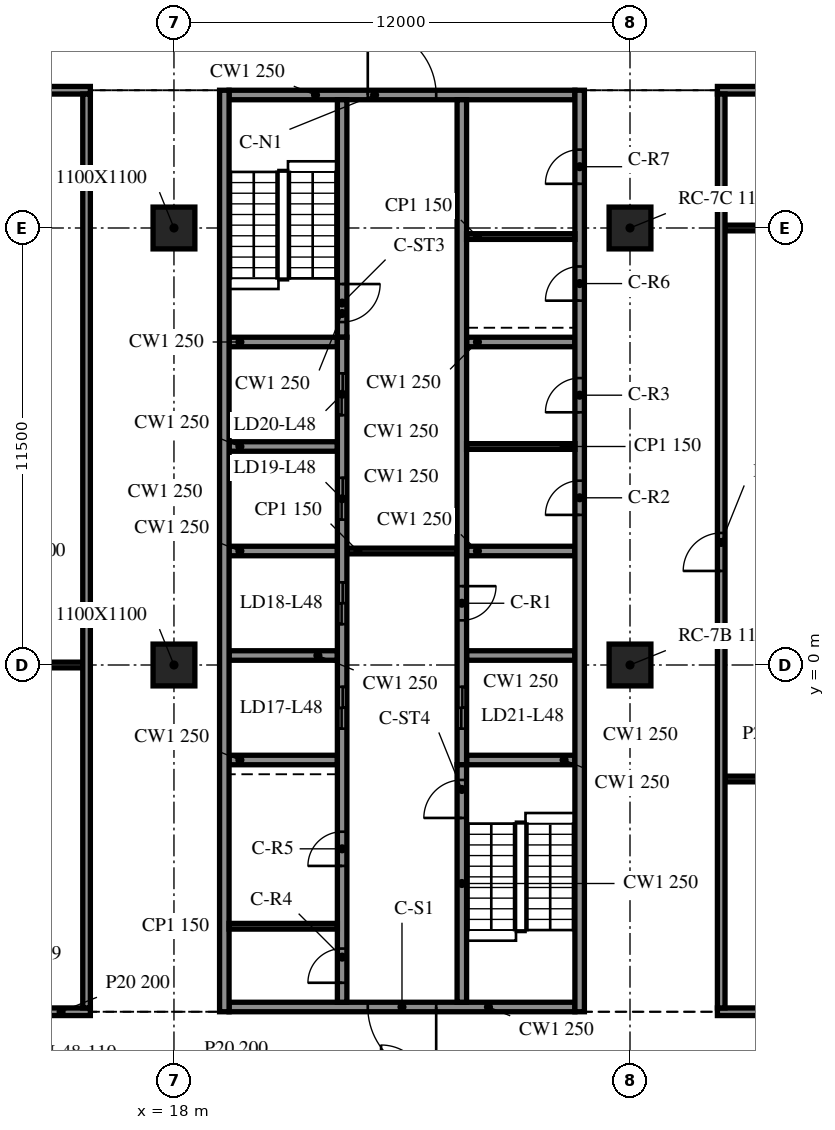
"""IFC4 building model, lengths in metres.
Left out: names, types, materials, properties, quantities, classifications, styles, units other than length and angle.
Written with IfcOpenShell. Run it as: python <this file> out.ifc"""

import sys

from ifc_helpers import new_model, si_unit, direction, frame, frame_2d, origin, origin_2d, place, context, subcontext, project, spatial, rectangle, extrude, element, fill, save


model = new_model("IFC4")
c1 = context("Model", 3, precision=1e-05, world=origin(), true_north=direction((0.0, 1.0)))
c2 = subcontext(c1, "Body", "Model", "MODEL_VIEW")
j1 = project(units=[si_unit("LENGTHUNIT", "METRE"), si_unit("PLANEANGLEUNIT", "RADIAN")], contexts=[c1])
p1 = place(None, origin())
s1 = spatial("IfcSite", under=j1, at=p1, CompositionType="ELEMENT")
p2 = place(p1, origin())
s2 = spatial("IfcBuilding", under=s1, at=p2, CompositionType="ELEMENT")
p3 = place(p2, frame((0.0, 0.0, 201.5)))
s3 = spatial("IfcBuildingStorey", under=s2, at=p3, CompositionType="ELEMENT", Elevation=201.5)
for number, where, z_axis, x_axis in (
    (1, (18.0, 0.0, -0.34), (0.0, 0.0, 1.0), (1.0, 0.0, 0.0)),
    (2, (18.0, 11.5, -0.34), (0.0, 0.0, 1.0), (1.0, 0.0, 0.0)),
    (3, (30.0, 0.0, -0.34), (0.0, 0.0, 1.0), (1.0, 0.0, 0.0)),
    (4, (30.0, 11.5, -0.34), (0.0, 0.0, 1.0), (1.0, 0.0, 0.0)),
):
    element("IfcColumn", number, at=place(p3, frame(where, z_axis=z_axis, x_axis=x_axis)), inside=s3, PredefinedType="COLUMN", context=c2, shape_type="SweptSolid", body=[
        extrude(rectangle(XDim=1.1, YDim=1.1, at=origin_2d()), origin(), (0.0, 0.0, 1.0), 3.8),
    ])
p4 = place(p3, frame((19.325, 15.125, 0.0), z_axis=(0.0, 0.0, 1.0), x_axis=(0.0, -1.0, 0.0)))
e5 = element("IfcWall", 5, at=p4, inside=s3, PredefinedType="SOLIDWALL", context=c2, shape_type="SweptSolid", body=[
    extrude(rectangle(XDim=24.25, YDim=0.25, at=frame_2d((12.125, 0.0))), origin(), (0.0, 0.0, 1.0), 3.46),
])
p5 = place(p3, frame((28.675, -9.125, 0.0), z_axis=(0.0, 0.0, 1.0), x_axis=(0.0, 1.0, 0.0)))
e6 = element("IfcWall", 6, at=p5, inside=s3, PredefinedType="SOLIDWALL", context=c2, shape_type="SweptSolid", body=[
    extrude(rectangle(XDim=24.25, YDim=0.25, at=frame_2d((12.125, 0.0))), origin(), (0.0, 0.0, 1.0), 3.46),
])
p6 = place(p5, frame((13.075, 0.0, 0.0)))
e7 = element("IfcOpeningElement", 7, at=p6, cuts=e6, PredefinedType="OPENING", context=c2, shape_type="SweptSolid", body=[
    extrude(rectangle(XDim=0.9, YDim=2.1, at=frame_2d((0.45, 1.05))), frame((0.0, 0.135, 0.0), z_axis=(0.0, -1.0, 0.0), x_axis=(1.0, 0.0, 0.0)), (0.0, 0.0, 1.0), 0.27),
])
p7 = place(p5, frame((15.775, 0.0, 0.0)))
e8 = element("IfcOpeningElement", 8, at=p7, cuts=e6, PredefinedType="OPENING", context=c2, shape_type="SweptSolid", body=[
    extrude(rectangle(XDim=0.9, YDim=2.1, at=frame_2d((0.45, 1.05))), frame((0.0, 0.135, 0.0), z_axis=(0.0, -1.0, 0.0), x_axis=(1.0, 0.0, 0.0)), (0.0, 0.0, 1.0), 0.27),
])
p8 = place(p5, frame((18.712, 0.0, 0.0)))
e9 = element("IfcOpeningElement", 9, at=p8, cuts=e6, PredefinedType="OPENING", context=c2, shape_type="SweptSolid", body=[
    extrude(rectangle(XDim=0.9, YDim=2.1, at=frame_2d((0.45, 1.05))), frame((0.0, 0.135, 0.0), z_axis=(0.0, -1.0, 0.0), x_axis=(1.0, 0.0, 0.0)), (0.0, 0.0, 1.0), 0.27),
])
p9 = place(p5, frame((21.788, 0.0, 0.0)))
e10 = element("IfcOpeningElement", 10, at=p9, cuts=e6, PredefinedType="OPENING", context=c2, shape_type="SweptSolid", body=[
    extrude(rectangle(XDim=0.9, YDim=2.1, at=frame_2d((0.45, 1.05))), frame((0.0, 0.135, 0.0), z_axis=(0.0, -1.0, 0.0), x_axis=(1.0, 0.0, 0.0)), (0.0, 0.0, 1.0), 0.27),
])
p10 = place(p3, frame((28.55, -9.0, 0.0), z_axis=(0.0, 0.0, 1.0), x_axis=(-1.0, 0.0, 0.0)))
e11 = element("IfcWall", 11, at=p10, inside=s3, PredefinedType="SOLIDWALL", context=c2, shape_type="SweptSolid", body=[
    extrude(rectangle(XDim=9.1, YDim=0.25, at=frame_2d((4.55, 0.0))), origin(), (0.0, 0.0, 1.0), 3.46),
])
p11 = place(p10, frame((3.65, 0.0, 0.0)))
e12 = element("IfcOpeningElement", 12, at=p11, cuts=e11, PredefinedType="OPENING", context=c2, shape_type="SweptSolid", body=[
    extrude(rectangle(XDim=1.8, YDim=2.1, at=frame_2d((0.9, 1.05))), frame((0.0, 0.135, 0.0), z_axis=(0.0, -1.0, 0.0), x_axis=(1.0, 0.0, 0.0)), (0.0, 0.0, 1.0), 0.27),
])
p12 = place(p3, frame((19.45, 15.0, 0.0), z_axis=(0.0, 0.0, 1.0), x_axis=(1.0, 0.0, 0.0)))
e13 = element("IfcWall", 13, at=p12, inside=s3, PredefinedType="SOLIDWALL", context=c2, shape_type="SweptSolid", body=[
    extrude(rectangle(XDim=9.1, YDim=0.25, at=frame_2d((4.55, 0.0))), origin(), (0.0, 0.0, 1.0), 3.46),
])
p13 = place(p12, frame((3.65, 0.0, 0.0)))
e14 = element("IfcOpeningElement", 14, at=p13, cuts=e13, PredefinedType="OPENING", context=c2, shape_type="SweptSolid", body=[
    extrude(rectangle(XDim=1.8, YDim=2.1, at=frame_2d((0.9, 1.05))), frame((0.0, 0.135, 0.0), z_axis=(0.0, -1.0, 0.0), x_axis=(1.0, 0.0, 0.0)), (0.0, 0.0, 1.0), 0.27),
])
p14 = place(p3, frame((22.425, -8.875, 0.0), z_axis=(0.0, 0.0, 1.0), x_axis=(0.0, 1.0, 0.0)))
e15 = element("IfcWall", 15, at=p14, inside=s3, PredefinedType="SOLIDWALL", context=c2, shape_type="SweptSolid", body=[
    extrude(rectangle(XDim=17.5, YDim=0.25, at=frame_2d((8.75, 0.0))), origin(), (0.0, 0.0, 1.0), 3.46),
])
p15 = place(p14, frame((7.2, 0.0, 0.0)))
e16 = element("IfcOpeningElement", 16, at=p15, cuts=e15, PredefinedType="OPENING", context=c2, shape_type="SweptSolid", body=[
    extrude(rectangle(XDim=1.1, YDim=2.1, at=frame_2d((0.55, 1.05))), frame((0.0, 0.135, 0.0), z_axis=(0.0, -1.0, 0.0), x_axis=(1.0, 0.0, 0.0)), (0.0, 0.0, 1.0), 0.27),
])
p16 = place(p14, frame((9.95, 0.0, 0.0)))
e17 = element("IfcOpeningElement", 17, at=p16, cuts=e15, PredefinedType="OPENING", context=c2, shape_type="SweptSolid", body=[
    extrude(rectangle(XDim=1.1, YDim=2.1, at=frame_2d((0.55, 1.05))), frame((0.0, 0.135, 0.0), z_axis=(0.0, -1.0, 0.0), x_axis=(1.0, 0.0, 0.0)), (0.0, 0.0, 1.0), 0.27),
])
p17 = place(p14, frame((12.7, 0.0, 0.0)))
e18 = element("IfcOpeningElement", 18, at=p17, cuts=e15, PredefinedType="OPENING", context=c2, shape_type="SweptSolid", body=[
    extrude(rectangle(XDim=1.1, YDim=2.1, at=frame_2d((0.55, 1.05))), frame((0.0, 0.135, 0.0), z_axis=(0.0, -1.0, 0.0), x_axis=(1.0, 0.0, 0.0)), (0.0, 0.0, 1.0), 0.27),
])
p18 = place(p14, frame((15.45, 0.0, 0.0)))
e19 = element("IfcOpeningElement", 19, at=p18, cuts=e15, PredefinedType="OPENING", context=c2, shape_type="SweptSolid", body=[
    extrude(rectangle(XDim=1.1, YDim=2.1, at=frame_2d((0.55, 1.05))), frame((0.0, 0.135, 0.0), z_axis=(0.0, -1.0, 0.0), x_axis=(1.0, 0.0, 0.0)), (0.0, 0.0, 1.0), 0.27),
])
p19 = place(p14, frame((0.512, 0.0, 0.0)))
e20 = element("IfcOpeningElement", 20, at=p19, cuts=e15, PredefinedType="OPENING", context=c2, shape_type="SweptSolid", body=[
    extrude(rectangle(XDim=0.9, YDim=2.1, at=frame_2d((0.45, 1.05))), frame((0.0, 0.135, 0.0), z_axis=(0.0, -1.0, 0.0), x_axis=(1.0, 0.0, 0.0)), (0.0, 0.0, 1.0), 0.27),
])
p20 = place(p14, frame((3.587, 0.0, 0.0)))
e21 = element("IfcOpeningElement", 21, at=p20, cuts=e15, PredefinedType="OPENING", context=c2, shape_type="SweptSolid", body=[
    extrude(rectangle(XDim=0.9, YDim=2.1, at=frame_2d((0.45, 1.05))), frame((0.0, 0.135, 0.0), z_axis=(0.0, -1.0, 0.0), x_axis=(1.0, 0.0, 0.0)), (0.0, 0.0, 1.0), 0.27),
])
p21 = place(p3, frame((22.425, 14.875, 0.0), z_axis=(0.0, 0.0, 1.0), x_axis=(0.0, -1.0, 0.0)))
e22 = element("IfcWall", 22, at=p21, inside=s3, PredefinedType="SOLIDWALL", context=c2, shape_type="SweptSolid", body=[
    extrude(rectangle(XDim=6.25, YDim=0.25, at=frame_2d((3.125, 0.0))), origin(), (0.0, 0.0, 1.0), 3.46),
])
p22 = place(p21, frame((4.85, 0.0, 0.0)))
e23 = element("IfcOpeningElement", 23, at=p22, cuts=e22, PredefinedType="OPENING", context=c2, shape_type="SweptSolid", body=[
    extrude(rectangle(XDim=1.0, YDim=2.1, at=frame_2d((0.5, 1.05))), frame((0.0, 0.135, 0.0), z_axis=(0.0, -1.0, 0.0), x_axis=(1.0, 0.0, 0.0)), (0.0, 0.0, 1.0), 0.27),
])
p23 = place(p3, frame((25.575, -8.875, 0.0), z_axis=(0.0, 0.0, 1.0), x_axis=(0.0, 1.0, 0.0)))
e24 = element("IfcWall", 24, at=p23, inside=s3, PredefinedType="SOLIDWALL", context=c2, shape_type="SweptSolid", body=[
    extrude(rectangle(XDim=6.25, YDim=0.25, at=frame_2d((3.125, 0.0))), origin(), (0.0, 0.0, 1.0), 3.46),
])
p24 = place(p23, frame((4.85, 0.0, 0.0)))
e25 = element("IfcOpeningElement", 25, at=p24, cuts=e24, PredefinedType="OPENING", context=c2, shape_type="SweptSolid", body=[
    extrude(rectangle(XDim=1.0, YDim=2.1, at=frame_2d((0.5, 1.05))), frame((0.0, 0.135, 0.0), z_axis=(0.0, -1.0, 0.0), x_axis=(1.0, 0.0, 0.0)), (0.0, 0.0, 1.0), 0.27),
])
p25 = place(p3, frame((25.575, 14.875, 0.0), z_axis=(0.0, 0.0, 1.0), x_axis=(0.0, -1.0, 0.0)))
e26 = element("IfcWall", 26, at=p25, inside=s3, PredefinedType="SOLIDWALL", context=c2, shape_type="SweptSolid", body=[
    extrude(rectangle(XDim=17.5, YDim=0.25, at=frame_2d((8.75, 0.0))), origin(), (0.0, 0.0, 1.0), 3.46),
])
p26 = place(p25, frame((15.45, 0.0, 0.0)))
e27 = element("IfcOpeningElement", 27, at=p26, cuts=e26, PredefinedType="OPENING", context=c2, shape_type="SweptSolid", body=[
    extrude(rectangle(XDim=1.1, YDim=2.1, at=frame_2d((0.55, 1.05))), frame((0.0, 0.135, 0.0), z_axis=(0.0, -1.0, 0.0), x_axis=(1.0, 0.0, 0.0)), (0.0, 0.0, 1.0), 0.27),
])
p27 = place(p25, frame((12.8, 0.0, 0.0)))
e28 = element("IfcOpeningElement", 28, at=p27, cuts=e26, PredefinedType="OPENING", context=c2, shape_type="SweptSolid", body=[
    extrude(rectangle(XDim=0.9, YDim=2.1, at=frame_2d((0.45, 1.05))), frame((0.0, 0.135, 0.0), z_axis=(0.0, -1.0, 0.0), x_axis=(1.0, 0.0, 0.0)), (0.0, 0.0, 1.0), 0.27),
])
for number, where, z_axis, x_axis in (
    (29, (19.45, -2.5, 0.0), (0.0, 0.0, 1.0), (1.0, 0.0, 0.0)),
    (30, (19.45, 0.25, 0.0), (0.0, 0.0, 1.0), (1.0, 0.0, 0.0)),
    (31, (19.45, 3.0, 0.0), (0.0, 0.0, 1.0), (1.0, 0.0, 0.0)),
    (32, (19.45, 5.75, 0.0), (0.0, 0.0, 1.0), (1.0, 0.0, 0.0)),
    (33, (19.45, 8.5, 0.0), (0.0, 0.0, 1.0), (1.0, 0.0, 0.0)),
    (34, (25.7, -2.5, 0.0), (0.0, 0.0, 1.0), (1.0, 0.0, 0.0)),
    (35, (25.7, 0.25, 0.0), (0.0, 0.0, 1.0), (1.0, 0.0, 0.0)),
    (36, (25.7, 3.0, 0.0), (0.0, 0.0, 1.0), (1.0, 0.0, 0.0)),
    (37, (25.7, 8.5, 0.0), (0.0, 0.0, 1.0), (1.0, 0.0, 0.0)),
):
    element("IfcWall", number, at=place(p3, frame(where, z_axis=z_axis, x_axis=x_axis)), inside=s3, PredefinedType="SOLIDWALL", context=c2, shape_type="SweptSolid", body=[
        extrude(rectangle(XDim=2.85, YDim=0.25, at=frame_2d((1.425, 0.0))), origin(), (0.0, 0.0, 1.0), 3.46),
    ])
p28 = place(p3, frame((22.55, 3.0, 0.0), z_axis=(0.0, 0.0, 1.0), x_axis=(1.0, 0.0, 0.0)))
e38 = element("IfcWall", 38, at=p28, inside=s3, PredefinedType="PARTITIONING", context=c2, shape_type="SweptSolid", body=[
    extrude(rectangle(XDim=2.9, YDim=0.15, at=frame_2d((1.45, 0.0))), origin(), (0.0, 0.0, 1.0), 3.46),
])
for number, where, z_axis, x_axis in (
    (39, (25.7, 5.75, 0.0), (0.0, 0.0, 1.0), (1.0, 0.0, 0.0)),
    (40, (19.45, -6.875, 0.0), (0.0, 0.0, 1.0), (1.0, 0.0, 0.0)),
    (41, (25.7, 11.275, 0.0), (0.0, 0.0, 1.0), (1.0, 0.0, 0.0)),
):
    element("IfcWall", number, at=place(p3, frame(where, z_axis=z_axis, x_axis=x_axis)), inside=s3, PredefinedType="PARTITIONING", context=c2, shape_type="SweptSolid", body=[
        extrude(rectangle(XDim=2.85, YDim=0.15, at=frame_2d((1.425, 0.0))), origin(), (0.0, 0.0, 1.0), 3.46),
    ])
p29 = place(p3, frame((8.1, -9.125, 0.0), z_axis=(0.0, 0.0, 1.0), x_axis=(1.0, 0.0, 0.0)))
e42 = element("IfcWall", 42, at=p29, inside=s3, PredefinedType="PARTITIONING", context=c2, shape_type="SweptSolid", body=[
    extrude(rectangle(XDim=7.7, YDim=0.2, at=frame_2d((3.85, 0.0))), origin(), (0.0, 0.0, 1.0), 3.46),
])
p30 = place(p29, frame((3.3, 0.0, 0.0)))
e43 = element("IfcOpeningElement", 43, at=p30, cuts=e42, PredefinedType="OPENING", context=c2, shape_type="SweptSolid", body=[
    extrude(rectangle(XDim=1.0, YDim=2.1, at=frame_2d((0.5, 1.05))), frame((0.0, 0.11, 0.0), z_axis=(0.0, -1.0, 0.0), x_axis=(1.0, 0.0, 0.0)), (0.0, 0.0, 1.0), 0.22),
])
p31 = place(p3, frame((32.3, -9.125, 0.0), z_axis=(0.0, 0.0, 1.0), x_axis=(1.0, 0.0, 0.0)))
e44 = element("IfcWall", 44, at=p31, inside=s3, PredefinedType="PARTITIONING", context=c2, shape_type="SweptSolid", body=[
    extrude(rectangle(XDim=21.55, YDim=0.2, at=frame_2d((10.775, 0.0))), origin(), (0.0, 0.0, 1.0), 3.46),
])
p32 = place(p31, frame((10.1, 0.0, 0.0)))
e45 = element("IfcOpeningElement", 45, at=p32, cuts=e44, PredefinedType="OPENING", context=c2, shape_type="SweptSolid", body=[
    extrude(rectangle(XDim=1.2, YDim=2.1, at=frame_2d((0.6, 1.05))), frame((0.0, 0.11, 0.0), z_axis=(0.0, -1.0, 0.0), x_axis=(1.0, 0.0, 0.0)), (0.0, 0.0, 1.0), 0.22),
])
p33 = place(p3, frame((32.5, -3.0, 0.0), z_axis=(0.0, 0.0, 1.0), x_axis=(1.0, 0.0, 0.0)))
e46 = element("IfcWall", 46, at=p33, inside=s3, PredefinedType="PARTITIONING", context=c2, shape_type="SweptSolid", body=[
    extrude(rectangle(XDim=21.35, YDim=0.15, at=frame_2d((10.675, 0.0))), origin(), (0.0, 0.0, 1.0), 3.46),
])
p34 = place(p3, frame((8.3, 0.0, 0.0), z_axis=(0.0, 0.0, 1.0), x_axis=(1.0, 0.0, 0.0)))
e47 = element("IfcWall", 47, at=p34, inside=s3, PredefinedType="PARTITIONING", context=c2, shape_type="SweptSolid", body=[
    extrude(rectangle(XDim=7.3, YDim=0.15, at=frame_2d((3.65, 0.0))), origin(), (0.0, 0.0, 1.0), 3.46),
])
p35 = place(p3, frame((32.5, 11.5, 0.0), z_axis=(0.0, 0.0, 1.0), x_axis=(1.0, 0.0, 0.0)))
e48 = element("IfcWall", 48, at=p35, inside=s3, PredefinedType="PARTITIONING", context=c2, shape_type="SweptSolid", body=[
    extrude(rectangle(XDim=8.95, YDim=0.15, at=frame_2d((4.475, 0.0))), origin(), (0.0, 0.0, 1.0), 3.46),
])
p36 = place(p3, frame((8.1, 15.125, 0.0), z_axis=(0.0, 0.0, 1.0), x_axis=(1.0, 0.0, 0.0)))
e49 = element("IfcWall", 49, at=p36, inside=s3, PredefinedType="PARTITIONING", context=c2, shape_type="SweptSolid", body=[
    extrude(rectangle(XDim=7.7, YDim=0.2, at=frame_2d((3.85, 0.0))), origin(), (0.0, 0.0, 1.0), 3.46),
])
p37 = place(p3, frame((32.3, 15.125, 0.0), z_axis=(0.0, 0.0, 1.0), x_axis=(1.0, 0.0, 0.0)))
e50 = element("IfcWall", 50, at=p37, inside=s3, PredefinedType="PARTITIONING", context=c2, shape_type="SweptSolid", body=[
    extrude(rectangle(XDim=21.55, YDim=0.2, at=frame_2d((10.775, 0.0))), origin(), (0.0, 0.0, 1.0), 3.46),
])
p38 = place(p37, frame((10.3, 0.0, 0.0)))
e51 = element("IfcOpeningElement", 51, at=p38, cuts=e50, PredefinedType="OPENING", context=c2, shape_type="SweptSolid", body=[
    extrude(rectangle(XDim=1.0, YDim=2.1, at=frame_2d((0.5, 1.05))), frame((0.0, 0.11, 0.0), z_axis=(0.0, -1.0, 0.0), x_axis=(1.0, 0.0, 0.0)), (0.0, 0.0, 1.0), 0.22),
])
p39 = place(p3, frame((15.7, -9.025, 0.0), z_axis=(0.0, 0.0, 1.0), x_axis=(0.0, 1.0, 0.0)))
e52 = element("IfcWall", 52, at=p39, inside=s3, PredefinedType="PARTITIONING", context=c2, shape_type="SweptSolid", body=[
    extrude(rectangle(XDim=24.05, YDim=0.2, at=frame_2d((12.025, 0.0))), origin(), (0.0, 0.0, 1.0), 3.46),
])
p40 = place(p3, frame((32.4, -9.025, 0.0), z_axis=(0.0, 0.0, 1.0), x_axis=(0.0, 1.0, 0.0)))
e53 = element("IfcWall", 53, at=p40, inside=s3, PredefinedType="PARTITIONING", context=c2, shape_type="SweptSolid", body=[
    extrude(rectangle(XDim=24.05, YDim=0.2, at=frame_2d((12.025, 0.0))), origin(), (0.0, 0.0, 1.0), 3.46),
])
p41 = place(p40, frame((11.5, 0.0, 0.0)))
e54 = element("IfcOpeningElement", 54, at=p41, cuts=e53, PredefinedType="OPENING", context=c2, shape_type="SweptSolid", body=[
    extrude(rectangle(XDim=1.0, YDim=2.1, at=frame_2d((0.5, 1.05))), frame((0.0, 0.11, 0.0), z_axis=(0.0, -1.0, 0.0), x_axis=(1.0, 0.0, 0.0)), (0.0, 0.0, 1.0), 0.22),
])
p42 = place(p11, origin())
e55 = element("IfcDoor", 55, at=p42, inside=s3, OperationType="DOUBLE_DOOR_SINGLE_SWING", PredefinedType="DOOR", context=c2, shape_type="SweptSolid", body=[
    extrude(rectangle(XDim=1.8, YDim=2.1, at=frame_2d((0.9, 1.05))), frame((0.0, 0.025, 0.0), z_axis=(0.0, -1.0, 0.0), x_axis=(1.0, 0.0, 0.0)), (0.0, 0.0, 1.0), 0.05),
])
fill(e12, e55)
p43 = place(p13, origin())
e56 = element("IfcDoor", 56, at=p43, inside=s3, OperationType="DOUBLE_DOOR_SINGLE_SWING", PredefinedType="DOOR", context=c2, shape_type="SweptSolid", body=[
    extrude(rectangle(XDim=1.8, YDim=2.1, at=frame_2d((0.9, 1.05))), frame((0.0, 0.025, 0.0), z_axis=(0.0, -1.0, 0.0), x_axis=(1.0, 0.0, 0.0)), (0.0, 0.0, 1.0), 0.05),
])
fill(e14, e56)
p44 = place(p26, origin())
e57 = element("IfcDoor", 57, at=p44, inside=s3, OperationType="DOUBLE_DOOR_SLIDING", PredefinedType="DOOR", context=c2, shape_type="SweptSolid", body=[
    extrude(rectangle(XDim=1.1, YDim=2.1, at=frame_2d((0.55, 1.05))), frame((0.0, 0.025, 0.0), z_axis=(0.0, -1.0, 0.0), x_axis=(1.0, 0.0, 0.0)), (0.0, 0.0, 1.0), 0.05),
])
fill(e27, e57)
p45 = place(p15, origin())
e58 = element("IfcDoor", 58, at=p45, inside=s3, OperationType="DOUBLE_DOOR_SLIDING", PredefinedType="DOOR", context=c2, shape_type="SweptSolid", body=[
    extrude(rectangle(XDim=1.1, YDim=2.1, at=frame_2d((0.55, 1.05))), frame((0.0, 0.025, 0.0), z_axis=(0.0, -1.0, 0.0), x_axis=(1.0, 0.0, 0.0)), (0.0, 0.0, 1.0), 0.05),
])
fill(e16, e58)
p46 = place(p16, origin())
e59 = element("IfcDoor", 59, at=p46, inside=s3, OperationType="DOUBLE_DOOR_SLIDING", PredefinedType="DOOR", context=c2, shape_type="SweptSolid", body=[
    extrude(rectangle(XDim=1.1, YDim=2.1, at=frame_2d((0.55, 1.05))), frame((0.0, 0.025, 0.0), z_axis=(0.0, -1.0, 0.0), x_axis=(1.0, 0.0, 0.0)), (0.0, 0.0, 1.0), 0.05),
])
fill(e17, e59)
p47 = place(p17, origin())
e60 = element("IfcDoor", 60, at=p47, inside=s3, OperationType="DOUBLE_DOOR_SLIDING", PredefinedType="DOOR", context=c2, shape_type="SweptSolid", body=[
    extrude(rectangle(XDim=1.1, YDim=2.1, at=frame_2d((0.55, 1.05))), frame((0.0, 0.025, 0.0), z_axis=(0.0, -1.0, 0.0), x_axis=(1.0, 0.0, 0.0)), (0.0, 0.0, 1.0), 0.05),
])
fill(e18, e60)
p48 = place(p18, origin())
e61 = element("IfcDoor", 61, at=p48, inside=s3, OperationType="DOUBLE_DOOR_SLIDING", PredefinedType="DOOR", context=c2, shape_type="SweptSolid", body=[
    extrude(rectangle(XDim=1.1, YDim=2.1, at=frame_2d((0.55, 1.05))), frame((0.0, 0.025, 0.0), z_axis=(0.0, -1.0, 0.0), x_axis=(1.0, 0.0, 0.0)), (0.0, 0.0, 1.0), 0.05),
])
fill(e19, e61)
p49 = place(p27, origin())
e62 = element("IfcDoor", 62, at=p49, inside=s3, OperationType="SINGLE_SWING_LEFT", PredefinedType="DOOR", context=c2, shape_type="SweptSolid", body=[
    extrude(rectangle(XDim=0.9, YDim=2.1, at=frame_2d((0.45, 1.05))), frame((0.0, 0.025, 0.0), z_axis=(0.0, -1.0, 0.0), x_axis=(1.0, 0.0, 0.0)), (0.0, 0.0, 1.0), 0.05),
])
fill(e28, e62)
p50 = place(p6, origin())
e63 = element("IfcDoor", 63, at=p50, inside=s3, OperationType="SINGLE_SWING_RIGHT", PredefinedType="DOOR", context=c2, shape_type="SweptSolid", body=[
    extrude(rectangle(XDim=0.9, YDim=2.1, at=frame_2d((0.45, 1.05))), frame((0.0, 0.025, 0.0), z_axis=(0.0, -1.0, 0.0), x_axis=(1.0, 0.0, 0.0)), (0.0, 0.0, 1.0), 0.05),
])
fill(e7, e63)
p51 = place(p7, origin())
e64 = element("IfcDoor", 64, at=p51, inside=s3, OperationType="SINGLE_SWING_LEFT", PredefinedType="DOOR", context=c2, shape_type="SweptSolid", body=[
    extrude(rectangle(XDim=0.9, YDim=2.1, at=frame_2d((0.45, 1.05))), frame((0.0, 0.025, 0.0), z_axis=(0.0, -1.0, 0.0), x_axis=(1.0, 0.0, 0.0)), (0.0, 0.0, 1.0), 0.05),
])
fill(e8, e64)
p52 = place(p19, origin())
e65 = element("IfcDoor", 65, at=p52, inside=s3, OperationType="SINGLE_SWING_RIGHT", PredefinedType="DOOR", context=c2, shape_type="SweptSolid", body=[
    extrude(rectangle(XDim=0.9, YDim=2.1, at=frame_2d((0.45, 1.05))), frame((0.0, 0.025, 0.0), z_axis=(0.0, -1.0, 0.0), x_axis=(1.0, 0.0, 0.0)), (0.0, 0.0, 1.0), 0.05),
])
fill(e20, e65)
p53 = place(p20, origin())
e66 = element("IfcDoor", 66, at=p53, inside=s3, OperationType="SINGLE_SWING_LEFT", PredefinedType="DOOR", context=c2, shape_type="SweptSolid", body=[
    extrude(rectangle(XDim=0.9, YDim=2.1, at=frame_2d((0.45, 1.05))), frame((0.0, 0.025, 0.0), z_axis=(0.0, -1.0, 0.0), x_axis=(1.0, 0.0, 0.0)), (0.0, 0.0, 1.0), 0.05),
])
fill(e21, e66)
p54 = place(p8, origin())
e67 = element("IfcDoor", 67, at=p54, inside=s3, OperationType="SINGLE_SWING_RIGHT", PredefinedType="DOOR", context=c2, shape_type="SweptSolid", body=[
    extrude(rectangle(XDim=0.9, YDim=2.1, at=frame_2d((0.45, 1.05))), frame((0.0, 0.025, 0.0), z_axis=(0.0, -1.0, 0.0), x_axis=(1.0, 0.0, 0.0)), (0.0, 0.0, 1.0), 0.05),
])
fill(e9, e67)
p55 = place(p9, origin())
e68 = element("IfcDoor", 68, at=p55, inside=s3, OperationType="SINGLE_SWING_LEFT", PredefinedType="DOOR", context=c2, shape_type="SweptSolid", body=[
    extrude(rectangle(XDim=0.9, YDim=2.1, at=frame_2d((0.45, 1.05))), frame((0.0, 0.025, 0.0), z_axis=(0.0, -1.0, 0.0), x_axis=(1.0, 0.0, 0.0)), (0.0, 0.0, 1.0), 0.05),
])
fill(e10, e68)
p56 = place(p22, origin())
e69 = element("IfcDoor", 69, at=p56, inside=s3, OperationType="SINGLE_SWING_RIGHT", PredefinedType="DOOR", context=c2, shape_type="SweptSolid", body=[
    extrude(rectangle(XDim=1.0, YDim=2.1, at=frame_2d((0.5, 1.05))), frame((0.0, 0.025, 0.0), z_axis=(0.0, -1.0, 0.0), x_axis=(1.0, 0.0, 0.0)), (0.0, 0.0, 1.0), 0.05),
])
fill(e23, e69)
p57 = place(p24, origin())
e70 = element("IfcDoor", 70, at=p57, inside=s3, OperationType="SINGLE_SWING_LEFT", PredefinedType="DOOR", context=c2, shape_type="SweptSolid", body=[
    extrude(rectangle(XDim=1.0, YDim=2.1, at=frame_2d((0.5, 1.05))), frame((0.0, 0.025, 0.0), z_axis=(0.0, -1.0, 0.0), x_axis=(1.0, 0.0, 0.0)), (0.0, 0.0, 1.0), 0.05),
])
fill(e25, e70)
p58 = place(p41, origin())
e71 = element("IfcDoor", 71, at=p58, inside=s3, OperationType="SINGLE_SWING_RIGHT", PredefinedType="DOOR", context=c2, shape_type="SweptSolid", body=[
    extrude(rectangle(XDim=1.0, YDim=2.1, at=frame_2d((0.5, 1.05))), frame((0.0, 0.025, 0.0), z_axis=(0.0, -1.0, 0.0), x_axis=(1.0, 0.0, 0.0)), (0.0, 0.0, 1.0), 0.05),
])
fill(e54, e71)
save(model, sys.argv[1])
